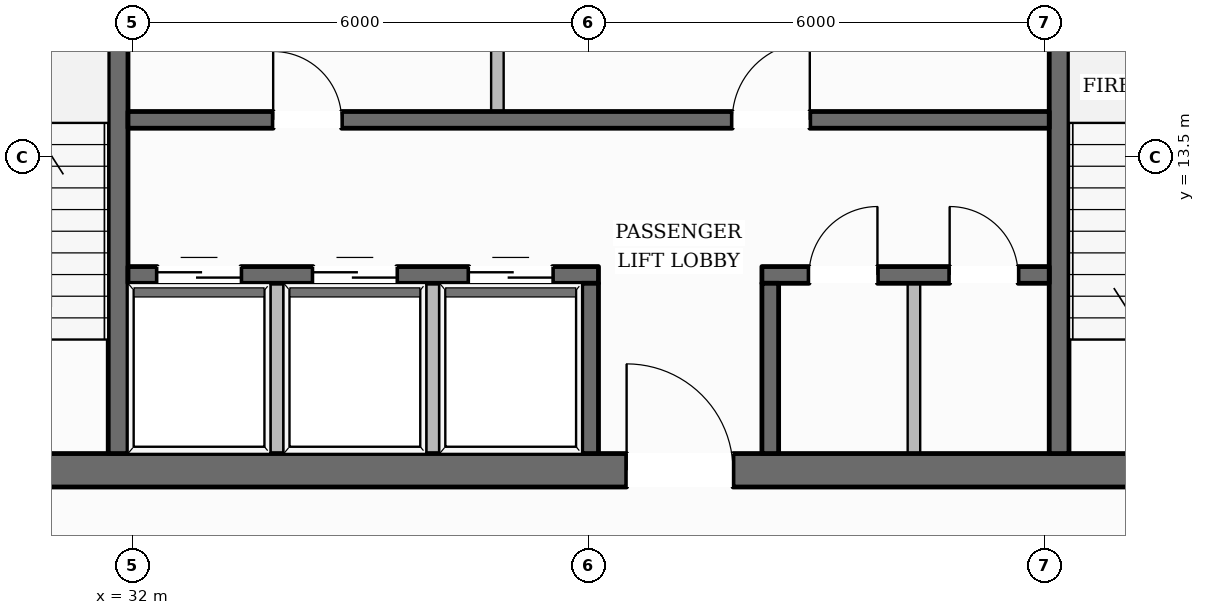
"""IFC4 building model, lengths in metres.
Left out: names, types, materials, properties, quantities, classifications, styles, units other than length and angle.
Written with IfcOpenShell. Run it as: python <this file> out.ifc"""

import sys

from ifc_helpers import new_model, si_unit, direction, frame, frame_2d, origin, place, context, subcontext, project, spatial, rectangle, extrude, element, fill, save


model = new_model("IFC4")
c1 = context("Model", 3, precision=1e-05, world=origin(), true_north=direction((0.0, 1.0)))
c2 = subcontext(c1, "Body", "Model", "MODEL_VIEW")
j1 = project(units=[si_unit("LENGTHUNIT", "METRE"), si_unit("PLANEANGLEUNIT", "RADIAN")], contexts=[c1])
p1 = place(None, origin())
s1 = spatial("IfcSite", under=j1, at=p1, CompositionType="ELEMENT")
p2 = place(p1, origin())
s2 = spatial("IfcBuilding", under=s1, at=p2, CompositionType="ELEMENT")
p3 = place(p2, frame((0.0, 0.0, 191.95)))
s3 = spatial("IfcBuildingStorey", under=s2, at=p3, CompositionType="ELEMENT", Elevation=191.95)
p4 = place(p3, frame((28.04, 9.38, 0.0), z_axis=(0.0, 0.0, 1.0), x_axis=(1.0, 0.0, 0.0)))
e1 = element("IfcWall", 1, at=p4, inside=s3, PredefinedType="SOLIDWALL", context=c2, shape_type="SweptSolid", body=[
    extrude(rectangle(XDim=19.92, YDim=0.44, at=frame_2d((9.96, 0.0))), origin(), (0.0, 0.0, 1.0), 3.6),
])
p5 = place(p4, frame((10.46, 0.0, 0.0)))
e2 = element("IfcOpeningElement", 2, at=p5, cuts=e1, PredefinedType="OPENING", context=c2, shape_type="SweptSolid", body=[
    extrude(rectangle(XDim=1.4, YDim=2.2, at=frame_2d((0.7, 1.1))), frame((0.0, 0.23, 0.0), z_axis=(0.0, -1.0, 0.0), x_axis=(1.0, 0.0, 0.0)), (0.0, 0.0, 1.0), 0.46),
])
p6 = place(p3, frame((31.81, 9.6, 0.0), z_axis=(0.0, 0.0, 1.0), x_axis=(0.0, 1.0, 0.0)))
e3 = element("IfcWall", 3, at=p6, inside=s3, PredefinedType="SHEAR", context=c2, shape_type="SweptSolid", body=[
    extrude(rectangle(XDim=13.0, YDim=0.26, at=frame_2d((6.5, 0.0))), origin(), (0.0, 0.0, 1.0), 3.6),
])
p7 = place(p6, frame((10.925, 0.0, 0.0)))
e4 = element("IfcOpeningElement", 4, at=p7, cuts=e3, PredefinedType="OPENING", context=c2, shape_type="SweptSolid", body=[
    extrude(rectangle(XDim=1.25, YDim=2.25, at=frame_2d((0.625, 1.125))), frame((0.0, 0.14, 0.0), z_axis=(0.0, -1.0, 0.0), x_axis=(1.0, 0.0, 0.0)), (0.0, 0.0, 1.0), 0.28),
])
p8 = place(p3, frame((44.19, 9.6, 0.0), z_axis=(0.0, 0.0, 1.0), x_axis=(0.0, 1.0, 0.0)))
e5 = element("IfcWall", 5, at=p8, inside=s3, PredefinedType="SHEAR", context=c2, shape_type="SweptSolid", body=[
    extrude(rectangle(XDim=13.0, YDim=0.26, at=frame_2d((6.5, 0.0))), origin(), (0.0, 0.0, 1.0), 3.6),
])
p9 = place(p8, frame((10.925, 0.0, 0.0)))
e6 = element("IfcOpeningElement", 6, at=p9, cuts=e5, PredefinedType="OPENING", context=c2, shape_type="SweptSolid", body=[
    extrude(rectangle(XDim=1.25, YDim=2.25, at=frame_2d((0.625, 1.125))), frame((0.0, 0.14, 0.0), z_axis=(0.0, -1.0, 0.0), x_axis=(1.0, 0.0, 0.0)), (0.0, 0.0, 1.0), 0.28),
])
p10 = place(p3, frame((31.94, 13.99, 0.0), z_axis=(0.0, 0.0, 1.0), x_axis=(1.0, 0.0, 0.0)))
e7 = element("IfcWall", 7, at=p10, inside=s3, PredefinedType="SOLIDWALL", context=c2, shape_type="SweptSolid", body=[
    extrude(rectangle(XDim=12.12, YDim=0.22, at=frame_2d((6.06, 0.0))), origin(), (0.0, 0.0, 1.0), 3.6),
])
p11 = place(p10, frame((1.91, 0.0, 0.0)))
e8 = element("IfcOpeningElement", 8, at=p11, cuts=e7, PredefinedType="OPENING", context=c2, shape_type="SweptSolid", body=[
    extrude(rectangle(XDim=0.9, YDim=2.1, at=frame_2d((0.45, 1.05))), frame((0.0, 0.12, 0.0), z_axis=(0.0, -1.0, 0.0), x_axis=(1.0, 0.0, 0.0)), (0.0, 0.0, 1.0), 0.24),
])
p12 = place(p10, frame((7.95, 0.0, 0.0)))
e9 = element("IfcOpeningElement", 9, at=p12, cuts=e7, PredefinedType="OPENING", context=c2, shape_type="SweptSolid", body=[
    extrude(rectangle(XDim=1.02, YDim=2.15, at=frame_2d((0.51, 1.075))), frame((0.0, 0.12, 0.0), z_axis=(0.0, -1.0, 0.0), x_axis=(1.0, 0.0, 0.0)), (0.0, 0.0, 1.0), 0.24),
])
p13 = place(p3, frame((31.94, 11.95, 0.0), z_axis=(0.0, 0.0, 1.0), x_axis=(1.0, 0.0, 0.0)))
e10 = element("IfcWall", 10, at=p13, inside=s3, PredefinedType="SOLIDWALL", context=c2, shape_type="SweptSolid", body=[
    extrude(rectangle(XDim=6.19, YDim=0.22, at=frame_2d((3.095, 0.0))), origin(), (0.0, 0.0, 1.0), 3.6),
])
p14 = place(p13, frame((0.385, 0.0, 0.0)))
e11 = element("IfcOpeningElement", 11, at=p14, cuts=e10, PredefinedType="OPENING", context=c2, shape_type="SweptSolid", body=[
    extrude(rectangle(XDim=1.1, YDim=2.2, at=frame_2d((0.55, 1.1))), frame((0.0, 0.12, 0.0), z_axis=(0.0, -1.0, 0.0), x_axis=(1.0, 0.0, 0.0)), (0.0, 0.0, 1.0), 0.24),
])
p15 = place(p13, frame((2.435, 0.0, 0.0)))
e12 = element("IfcOpeningElement", 12, at=p15, cuts=e10, PredefinedType="OPENING", context=c2, shape_type="SweptSolid", body=[
    extrude(rectangle(XDim=1.1, YDim=2.2, at=frame_2d((0.55, 1.1))), frame((0.0, 0.12, 0.0), z_axis=(0.0, -1.0, 0.0), x_axis=(1.0, 0.0, 0.0)), (0.0, 0.0, 1.0), 0.24),
])
p16 = place(p13, frame((4.485, 0.0, 0.0)))
e13 = element("IfcOpeningElement", 13, at=p16, cuts=e10, PredefinedType="OPENING", context=c2, shape_type="SweptSolid", body=[
    extrude(rectangle(XDim=1.1, YDim=2.2, at=frame_2d((0.55, 1.1))), frame((0.0, 0.12, 0.0), z_axis=(0.0, -1.0, 0.0), x_axis=(1.0, 0.0, 0.0)), (0.0, 0.0, 1.0), 0.24),
])
p17 = place(p3, frame((40.28, 11.95, 0.0), z_axis=(0.0, 0.0, 1.0), x_axis=(1.0, 0.0, 0.0)))
e14 = element("IfcWall", 14, at=p17, inside=s3, PredefinedType="SOLIDWALL", context=c2, shape_type="SweptSolid", body=[
    extrude(rectangle(XDim=3.78, YDim=0.22, at=frame_2d((1.89, 0.0))), origin(), (0.0, 0.0, 1.0), 3.6),
])
p18 = place(p17, frame((0.62, 0.0, 0.0)))
e15 = element("IfcOpeningElement", 15, at=p18, cuts=e14, PredefinedType="OPENING", context=c2, shape_type="SweptSolid", body=[
    extrude(rectangle(XDim=0.9, YDim=2.1, at=frame_2d((0.45, 1.05))), frame((0.0, 0.12, 0.0), z_axis=(0.0, -1.0, 0.0), x_axis=(1.0, 0.0, 0.0)), (0.0, 0.0, 1.0), 0.24),
])
p19 = place(p17, frame((2.47, 0.0, 0.0)))
e16 = element("IfcOpeningElement", 16, at=p19, cuts=e14, PredefinedType="OPENING", context=c2, shape_type="SweptSolid", body=[
    extrude(rectangle(XDim=0.9, YDim=2.1, at=frame_2d((0.45, 1.05))), frame((0.0, 0.12, 0.0), z_axis=(0.0, -1.0, 0.0), x_axis=(1.0, 0.0, 0.0)), (0.0, 0.0, 1.0), 0.24),
])
for number, where, z_axis, x_axis in (
    (17, (38.02, 9.6, 0.0), (0.0, 0.0, 1.0), (0.0, 1.0, 0.0)),
    (18, (40.39, 9.6, 0.0), (0.0, 0.0, 1.0), (0.0, 1.0, 0.0)),
):
    element("IfcWall", number, at=place(p3, frame(where, z_axis=z_axis, x_axis=x_axis)), inside=s3, PredefinedType="SOLIDWALL", context=c2, shape_type="SweptSolid", body=[
        extrude(rectangle(XDim=2.24, YDim=0.22, at=frame_2d((1.12, 0.0))), origin(), (0.0, 0.0, 1.0), 3.6),
    ])
p20 = place(p3, frame((14.94, 11.763, 0.0), z_axis=(0.0, 0.0, 1.0), x_axis=(0.498943522518, 0.866634502739, 0.0)))
e19 = element("IfcWall", 19, at=p20, inside=s3, PredefinedType="STANDARD", context=c2, shape_type="SweptSolid", body=[
    extrude(rectangle(XDim=37.445, YDim=0.35, at=frame_2d((18.723, 0.0))), origin(), (0.0, 0.0, 1.0), 3.132),
])
p21 = place(p20, frame((27.484, 0.0, 0.0)))
e20 = element("IfcOpeningElement", 20, at=p21, cuts=e19, PredefinedType="OPENING", context=c2, shape_type="SweptSolid", body=[
    extrude(rectangle(XDim=1.0, YDim=2.2, at=frame_2d((0.5, 1.1))), frame((0.0, 0.185, 0.0), z_axis=(0.0, -1.0, 0.0), x_axis=(1.0, 0.0, 0.0)), (0.0, 0.0, 1.0), 0.37),
])
p22 = place(p20, frame((33.2, 0.0, 0.65)))
e21 = element("IfcOpeningElement", 21, at=p22, cuts=e19, PredefinedType="OPENING", context=c2, shape_type="SweptSolid", body=[
    extrude(rectangle(XDim=1.45, YDim=1.75, at=frame_2d((0.725, 0.875))), frame((0.0, 0.185, 0.0), z_axis=(0.0, -1.0, 0.0), x_axis=(1.0, 0.0, 0.0)), (0.0, 0.0, 1.0), 0.37),
])
p23 = place(p20, frame((21.038, 0.0, 0.65)))
e22 = element("IfcOpeningElement", 22, at=p23, cuts=e19, PredefinedType="OPENING", context=c2, shape_type="SweptSolid", body=[
    extrude(rectangle(XDim=1.45, YDim=1.75, at=frame_2d((0.725, 0.875))), frame((0.0, 0.185, 0.0), z_axis=(0.0, -1.0, 0.0), x_axis=(1.0, 0.0, 0.0)), (0.0, 0.0, 1.0), 0.37),
])
p24 = place(p20, frame((8.875, 0.0, 0.65)))
e23 = element("IfcOpeningElement", 23, at=p24, cuts=e19, PredefinedType="OPENING", context=c2, shape_type="SweptSolid", body=[
    extrude(rectangle(XDim=1.45, YDim=1.75, at=frame_2d((0.725, 0.875))), frame((0.0, 0.185, 0.0), z_axis=(0.0, -1.0, 0.0), x_axis=(1.0, 0.0, 0.0)), (0.0, 0.0, 1.0), 0.37),
])
p25 = place(p20, frame((2.795, 0.0, 0.65)))
e24 = element("IfcOpeningElement", 24, at=p25, cuts=e19, PredefinedType="OPENING", context=c2, shape_type="SweptSolid", body=[
    extrude(rectangle(XDim=1.45, YDim=1.75, at=frame_2d((0.725, 0.875))), frame((0.0, 0.185, 0.0), z_axis=(0.0, -1.0, 0.0), x_axis=(1.0, 0.0, 0.0)), (0.0, 0.0, 1.0), 0.37),
])
p26 = place(p3, frame((42.516, 44.131, 0.0), z_axis=(0.0, 0.0, 1.0), x_axis=(0.506310158323, -0.862351450152, 0.0)))
e25 = element("IfcWall", 25, at=p26, inside=s3, PredefinedType="STANDARD", context=c2, shape_type="SweptSolid", body=[
    extrude(rectangle(XDim=38.0, YDim=0.35, at=frame_2d((19.0, 0.0))), origin(), (0.0, 0.0, 1.0), 3.132),
])
p27 = place(p26, frame((33.708, 0.0, 0.65)))
e26 = element("IfcOpeningElement", 26, at=p27, cuts=e25, PredefinedType="OPENING", context=c2, shape_type="SweptSolid", body=[
    extrude(rectangle(XDim=1.45, YDim=1.75, at=frame_2d((0.725, 0.875))), frame((0.0, 0.185, 0.0), z_axis=(0.0, -1.0, 0.0), x_axis=(1.0, 0.0, 0.0)), (0.0, 0.0, 1.0), 0.37),
])
p28 = place(p26, frame((27.534, 0.0, 0.65)))
e27 = element("IfcOpeningElement", 27, at=p28, cuts=e25, PredefinedType="OPENING", context=c2, shape_type="SweptSolid", body=[
    extrude(rectangle(XDim=1.45, YDim=1.75, at=frame_2d((0.725, 0.875))), frame((0.0, 0.185, 0.0), z_axis=(0.0, -1.0, 0.0), x_axis=(1.0, 0.0, 0.0)), (0.0, 0.0, 1.0), 0.37),
])
p29 = place(p26, frame((21.359, 0.0, 0.65)))
e28 = element("IfcOpeningElement", 28, at=p29, cuts=e25, PredefinedType="OPENING", context=c2, shape_type="SweptSolid", body=[
    extrude(rectangle(XDim=1.45, YDim=1.75, at=frame_2d((0.725, 0.875))), frame((0.0, 0.185, 0.0), z_axis=(0.0, -1.0, 0.0), x_axis=(1.0, 0.0, 0.0)), (0.0, 0.0, 1.0), 0.37),
])
p30 = place(p26, frame((9.009, 0.0, 0.65)))
e29 = element("IfcOpeningElement", 29, at=p30, cuts=e25, PredefinedType="OPENING", context=c2, shape_type="SweptSolid", body=[
    extrude(rectangle(XDim=1.45, YDim=1.75, at=frame_2d((0.725, 0.875))), frame((0.0, 0.185, 0.0), z_axis=(0.0, -1.0, 0.0), x_axis=(1.0, 0.0, 0.0)), (0.0, 0.0, 1.0), 0.37),
])
p31 = place(p26, frame((2.834, 0.0, 0.65)))
e30 = element("IfcOpeningElement", 30, at=p31, cuts=e25, PredefinedType="OPENING", context=c2, shape_type="SweptSolid", body=[
    extrude(rectangle(XDim=1.45, YDim=1.75, at=frame_2d((0.725, 0.875))), frame((0.0, 0.185, 0.0), z_axis=(0.0, -1.0, 0.0), x_axis=(1.0, 0.0, 0.0)), (0.0, 0.0, 1.0), 0.37),
])
for number, where, z_axis, x_axis in (
    (31, (33.9, 9.52, 0.0), (0.0, 0.0, 1.0), (0.0, 1.0, 0.0)),
    (32, (35.95, 9.52, 0.0), (0.0, 0.0, 1.0), (0.0, 1.0, 0.0)),
):
    element("IfcWall", number, at=place(p3, frame(where, z_axis=z_axis, x_axis=x_axis)), inside=s3, PredefinedType="PARTITIONING", context=c2, shape_type="SweptSolid", body=[
        extrude(rectangle(XDim=2.32, YDim=0.165, at=frame_2d((1.16, 0.0))), origin(), (0.0, 0.0, 1.0), 3.6),
    ])
p32 = place(p3, frame((36.8, 14.1, 0.0), z_axis=(0.0, 0.0, 1.0), x_axis=(0.0, 1.0, 0.0)))
e33 = element("IfcWall", 33, at=p32, inside=s3, PredefinedType="PARTITIONING", context=c2, shape_type="SweptSolid", body=[
    extrude(rectangle(XDim=2.24, YDim=0.165, at=frame_2d((1.12, 0.0))), origin(), (0.0, 0.0, 1.0), 3.6),
])
p33 = place(p3, frame((42.28, 9.52, 0.0), z_axis=(0.0, 0.0, 1.0), x_axis=(0.0, 1.0, 0.0)))
e34 = element("IfcWall", 34, at=p33, inside=s3, PredefinedType="PARTITIONING", context=c2, shape_type="SweptSolid", body=[
    extrude(rectangle(XDim=2.32, YDim=0.165, at=frame_2d((1.16, 0.0))), origin(), (0.0, 0.0, 1.0), 3.6),
])
p34 = place(p5, origin())
e35 = element("IfcDoor", 35, at=p34, inside=s3, OperationType="SINGLE_SWING_LEFT", PredefinedType="DOOR", context=c2, shape_type="SweptSolid", body=[
    extrude(rectangle(XDim=1.4, YDim=2.2, at=frame_2d((0.7, 1.1))), frame((0.0, 0.025, 0.0), z_axis=(0.0, -1.0, 0.0), x_axis=(1.0, 0.0, 0.0)), (0.0, 0.0, 1.0), 0.05),
])
fill(e2, e35)
p35 = place(p14, origin())
e36 = element("IfcDoor", 36, at=p35, inside=s3, OperationType="DOUBLE_DOOR_SLIDING", PredefinedType="DOOR", context=c2, shape_type="SweptSolid", body=[
    extrude(rectangle(XDim=1.1, YDim=2.2, at=frame_2d((0.55, 1.1))), frame((0.0, 0.025, 0.0), z_axis=(0.0, -1.0, 0.0), x_axis=(1.0, 0.0, 0.0)), (0.0, 0.0, 1.0), 0.05),
])
fill(e11, e36)
p36 = place(p15, origin())
e37 = element("IfcDoor", 37, at=p36, inside=s3, OperationType="DOUBLE_DOOR_SLIDING", PredefinedType="DOOR", context=c2, shape_type="SweptSolid", body=[
    extrude(rectangle(XDim=1.1, YDim=2.2, at=frame_2d((0.55, 1.1))), frame((0.0, 0.025, 0.0), z_axis=(0.0, -1.0, 0.0), x_axis=(1.0, 0.0, 0.0)), (0.0, 0.0, 1.0), 0.05),
])
fill(e12, e37)
p37 = place(p16, origin())
e38 = element("IfcDoor", 38, at=p37, inside=s3, OperationType="DOUBLE_DOOR_SLIDING", PredefinedType="DOOR", context=c2, shape_type="SweptSolid", body=[
    extrude(rectangle(XDim=1.1, YDim=2.2, at=frame_2d((0.55, 1.1))), frame((0.0, 0.025, 0.0), z_axis=(0.0, -1.0, 0.0), x_axis=(1.0, 0.0, 0.0)), (0.0, 0.0, 1.0), 0.05),
])
fill(e13, e38)
p38 = place(p11, origin())
e39 = element("IfcDoor", 39, at=p38, inside=s3, OperationType="SINGLE_SWING_LEFT", PredefinedType="DOOR", context=c2, shape_type="SweptSolid", body=[
    extrude(rectangle(XDim=0.9, YDim=2.1, at=frame_2d((0.45, 1.05))), frame((0.0, 0.025, 0.0), z_axis=(0.0, -1.0, 0.0), x_axis=(1.0, 0.0, 0.0)), (0.0, 0.0, 1.0), 0.05),
])
fill(e8, e39)
p39 = place(p12, origin())
e40 = element("IfcDoor", 40, at=p39, inside=s3, OperationType="SINGLE_SWING_RIGHT", PredefinedType="DOOR", context=c2, shape_type="SweptSolid", body=[
    extrude(rectangle(XDim=1.02, YDim=2.15, at=frame_2d((0.51, 1.075))), frame((0.0, 0.025, 0.0), z_axis=(0.0, -1.0, 0.0), x_axis=(1.0, 0.0, 0.0)), (0.0, 0.0, 1.0), 0.05),
])
fill(e9, e40)
p40 = place(p18, origin())
e41 = element("IfcDoor", 41, at=p40, inside=s3, OperationType="SINGLE_SWING_RIGHT", PredefinedType="DOOR", context=c2, shape_type="SweptSolid", body=[
    extrude(rectangle(XDim=0.9, YDim=2.1, at=frame_2d((0.45, 1.05))), frame((0.0, 0.025, 0.0), z_axis=(0.0, -1.0, 0.0), x_axis=(1.0, 0.0, 0.0)), (0.0, 0.0, 1.0), 0.05),
])
fill(e15, e41)
p41 = place(p19, origin())
e42 = element("IfcDoor", 42, at=p41, inside=s3, OperationType="SINGLE_SWING_LEFT", PredefinedType="DOOR", context=c2, shape_type="SweptSolid", body=[
    extrude(rectangle(XDim=0.9, YDim=2.1, at=frame_2d((0.45, 1.05))), frame((0.0, 0.025, 0.0), z_axis=(0.0, -1.0, 0.0), x_axis=(1.0, 0.0, 0.0)), (0.0, 0.0, 1.0), 0.05),
])
fill(e16, e42)
save(model, sys.argv[1])
